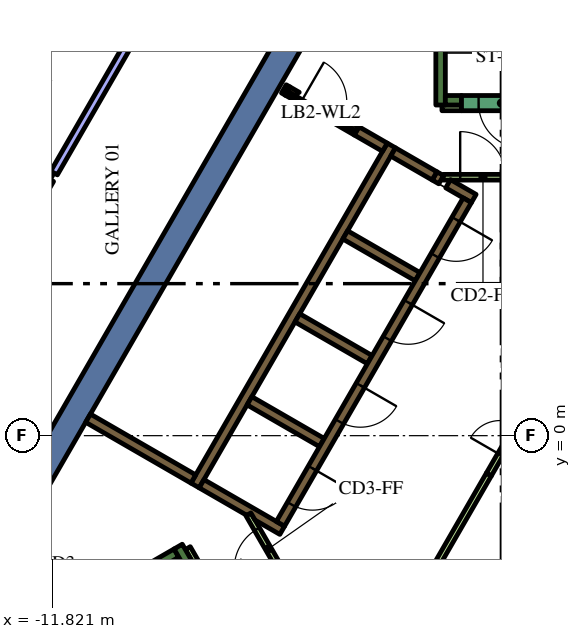
"""IFC4 building model, lengths in metres.
Left out: names, types, materials, properties, quantities, classifications, styles, units other than length and angle.
Written with IfcOpenShell. Run it as: python <this file> out.ifc"""

import sys

from ifc_helpers import new_model, si_unit, direction, frame, frame_2d, origin, place, context, subcontext, project, spatial, polyline, rectangle, outline, extrude, element, fill, save


model = new_model("IFC4")
c1 = context("Model", 3, precision=1e-05, world=origin(), true_north=direction((0.0, 1.0)))
c2 = subcontext(c1, "Body", "Model", "MODEL_VIEW")
j1 = project(units=[si_unit("LENGTHUNIT", "METRE"), si_unit("PLANEANGLEUNIT", "RADIAN")], contexts=[c1])
p1 = place(None, origin())
s1 = spatial("IfcSite", under=j1, at=p1, CompositionType="ELEMENT")
p2 = place(p1, origin())
s2 = spatial("IfcBuilding", under=s1, at=p2, CompositionType="ELEMENT")
p3 = place(p2, frame((0.0, 0.0, 231.0)))
s3 = spatial("IfcBuildingStorey", under=s2, at=p3, CompositionType="ELEMENT", Elevation=231.0)
p4 = place(p3, frame((-12.625, -1.867, 0.0), z_axis=(0.0, 0.0, 1.0), x_axis=(0.500008520515, 0.866020484407, 0.0)))
e1 = element("IfcWall", 1, at=p4, inside=s3, PredefinedType="SOLIDWALL", context=c2, shape_type="SweptSolid", body=[
    extrude(rectangle(XDim=15.859, YDim=0.7, at=frame_2d((7.929, 0.0))), origin(), (0.0, 0.0, 1.0), 4.2),
])
p5 = place(p3, frame((-1.6, 8.7, 0.0), z_axis=(0.0, 0.0, 1.0), x_axis=(0.0, 1.0, 0.0)))
e2 = element("IfcWall", 2, at=p5, inside=s3, PredefinedType="SOLIDWALL", context=c2, shape_type="SweptSolid", body=[
    extrude(rectangle(XDim=7.05, YDim=0.25, at=frame_2d((3.525, 0.0))), origin(), (0.0, 0.0, 1.0), 4.2),
])
p6 = place(p3, frame((-1.475, 8.825, 0.0), z_axis=(0.0, 0.0, 1.0), x_axis=(1.0, 0.0, 0.0)))
e3 = element("IfcWall", 3, at=p6, inside=s3, PredefinedType="SOLIDWALL", context=c2, shape_type="SweptSolid", body=[
    extrude(rectangle(XDim=0.425, YDim=0.25, at=frame_2d((0.212, 0.0))), origin(), (0.0, 0.0, 1.0), 4.2),
])
p7 = place(p3, frame((-14.44, -6.49, 0.0), z_axis=(0.0, 0.0, 1.0), x_axis=(0.866022966069, 0.500004222222, 0.0)))
e4 = element("IfcWall", 4, at=p7, inside=s3, PredefinedType="SOLIDWALL", context=c2, shape_type="SweptSolid", body=[
    extrude(rectangle(XDim=6.8, YDim=0.25, at=frame_2d((3.4, 0.0))), origin(), (0.0, 0.0, 1.0), 4.2),
])
p8 = place(p3, frame((-8.168, -3.503, 0.0), z_axis=(0.0, 0.0, 1.0), x_axis=(-0.499952099219, 0.866053057547, 0.0)))
e5 = element("IfcWall", 5, at=p8, inside=s3, PredefinedType="SOLIDWALL", context=c2, shape_type="SweptSolid", body=[
    extrude(rectangle(XDim=0.675, YDim=0.25, at=frame_2d((0.337, 0.0))), origin(), (0.0, 0.0, 1.0), 4.2),
])
p9 = place(p3, frame((-8.06, -1.311, 0.0), z_axis=(0.0, 0.0, 1.0), x_axis=(0.50000273126, 0.866023826885, 0.0)))
e6 = element("IfcWall", 6, at=p9, inside=s3, PredefinedType="SOLIDWALL", context=c2, shape_type="SweptSolid", body=[
    extrude(rectangle(XDim=10.33, YDim=0.25, at=frame_2d((5.165, 0.0))), origin(), (0.0, 0.0, 1.0), 4.2),
])
p10 = place(p3, frame((-1.758, 6.835, 0.0), z_axis=(0.0, 0.0, 1.0), x_axis=(0.865982457891, -0.500074377092, 0.0)))
e7 = element("IfcWall", 7, at=p10, inside=s3, PredefinedType="SOLIDWALL", context=c2, shape_type="SweptSolid", body=[
    extrude(rectangle(XDim=0.2, YDim=0.25, at=frame_2d((0.1, 0.0))), origin(), (0.0, 0.0, 1.0), 4.2),
])
p11 = place(p3, frame((-1.76, 6.836, 0.0), z_axis=(0.0, 0.0, 1.0), x_axis=(-0.865952863304, 0.500125622755, 0.0)))
e8 = element("IfcWall", 8, at=p11, inside=s3, PredefinedType="SOLIDWALL", context=c2, shape_type="SweptSolid", body=[
    extrude(rectangle(XDim=1.258, YDim=0.25, at=frame_2d((0.629, 0.0))), origin(), (0.0, 0.0, 1.0), 4.2),
])
p12 = place(p3, frame((-0.728, 6.24, 0.0), z_axis=(0.0, 0.0, 1.0), x_axis=(-0.865955664968, 0.500120771724, 0.0)))
e9 = element("IfcWall", 9, at=p12, inside=s3, PredefinedType="SOLIDWALL", context=c2, shape_type="SweptSolid", body=[
    extrude(rectangle(XDim=0.778, YDim=0.25, at=frame_2d((0.389, 0.0))), origin(), (0.0, 0.0, 1.0), 4.2),
])
for number, where, z_axis, x_axis in (
    (10, (-2.204, 4.182, 0.0), (0.0, 0.0, 1.0), (-0.866, 0.5, 0.0)),
    (11, (-5.369, 3.1, 0.0), (0.0, 0.0, 1.0), (0.866, -0.5, 0.0)),
    (12, (-4.724, -0.182, 0.0), (0.0, 0.0, 1.0), (-0.866, 0.5, 0.0)),
):
    element("IfcWall", number, at=place(p3, frame(where, z_axis=z_axis, x_axis=x_axis)), inside=s3, PredefinedType="SOLIDWALL", context=c2, shape_type="SweptSolid", body=[
        extrude(rectangle(XDim=2.2, YDim=0.25, at=frame_2d((1.1, 0.0))), origin(), (0.0, 0.0, 1.0), 4.2),
    ])
p13 = place(p3, origin())
e13 = element("IfcWall", 13, at=p13, inside=s3, PredefinedType="SOLIDWALL", context=c2, shape_type="SweptSolid", body=[
    extrude(outline(polyline([(-5.922, -2.257), (-5.922, -2.257), (-5.705, -2.382), (-5.83, -2.598), (-6.483, -2.221), (-6.591, -2.033), (-6.591, -2.033), (-6.7, -2.096), (-7.952, -1.373), (-7.827, -1.156), (-5.922, -2.257)])), origin(), (0.0, 0.0, 1.0), 4.2),
])
p14 = place(p3, frame((-8.106, -1.14, 0.0), z_axis=(0.0, 0.0, 1.0), x_axis=(-0.866008981251, 0.500028443584, 0.0)))
e14 = element("IfcWall", 14, at=p14, inside=s3, PredefinedType="SOLIDWALL", context=c2, shape_type="SweptSolid", body=[
    extrude(rectangle(XDim=3.2, YDim=0.25, at=frame_2d((1.6, 0.0))), origin(), (0.0, 0.0, 1.0), 4.2),
])
p15 = place(p3, frame((-5.725, 9.125, 0.0), z_axis=(0.0, 0.0, 1.0), x_axis=(0.866185586049, -0.49972245349, 0.0)))
e15 = element("IfcWall", 15, at=p15, inside=s3, PredefinedType="SOLIDWALL", context=c2, shape_type="SweptSolid", body=[
    extrude(rectangle(XDim=0.11, YDim=0.25, at=frame_2d((0.055, 0.0))), origin(), (0.0, 0.0, 1.0), 4.2),
])
p16 = place(p3, frame((-3.066, 7.59, 0.0), z_axis=(0.0, 0.0, 1.0), x_axis=(-0.866081358704, 0.49990307071, 0.0)))
e16 = element("IfcWall", 16, at=p16, inside=s3, PredefinedType="SOLIDWALL", context=c2, shape_type="SweptSolid", body=[
    extrude(rectangle(XDim=0.858, YDim=0.25, at=frame_2d((0.429, 0.0))), origin(), (0.0, 0.0, 1.0), 4.2),
])
e17 = element("IfcWall", 17, at=p13, inside=s3, PredefinedType="SOLIDWALL", context=c2, shape_type="SweptSolid", body=[
    extrude(outline(polyline([(-3.748, 8.128), (-3.813, 8.015), (-4.027, 8.139), (-4.017, 8.156), (-4.008, 8.173), (-4.0, 8.192), (-3.995, 8.21), (-3.991, 8.23), (-3.99, 8.25), (-3.99, 8.268), (-3.748, 8.128)])), origin(), (0.0, 0.0, 1.0), 4.2),
])
e18 = element("IfcWall", 18, at=p13, inside=s3, PredefinedType="SOLIDWALL", context=c2, shape_type="SweptSolid", body=[
    extrude(outline(polyline([(-5.689, 8.96), (-5.69, 8.961), (-5.565, 9.177), (-5.319, 9.035), (-5.335, 9.026), (-5.351, 9.015), (-5.366, 9.002), (-5.379, 8.988), (-5.392, 8.972), (-5.402, 8.956), (-5.412, 8.939), (-5.629, 9.064), (-5.629, 9.064), (-5.689, 8.96)])), origin(), (0.0, 0.0, 1.0), 4.2),
])
for number, where, z_axis, x_axis in (
    (19, (-8.252, -2.958, 0.0), (0.0, 0.0, 1.0), (0.5, -0.866, 0.0)),
    (20, (-1.564, 8.625, 0.0), (0.0, 0.0, 1.0), (1.0, 0.0, 0.0)),
):
    element("IfcWall", number, at=place(p3, frame(where, z_axis=z_axis, x_axis=x_axis)), inside=s3, PredefinedType="PARTITIONING", context=c2, shape_type="SweptSolid", body=[
        extrude(rectangle(XDim=0.514, YDim=0.15, at=frame_2d((0.257, 0.0))), origin(), (0.0, 0.0, 1.0), 3.45),
    ])
p17 = place(p3, frame((-1.887, -3.718, 0.0), z_axis=(0.0, 0.0, 1.0), x_axis=(0.500043732237, 0.866000153493, 0.0)))
e21 = element("IfcWall", 21, at=p17, inside=s3, PredefinedType="PARTITIONING", context=c2, shape_type="SweptSolid", body=[
    extrude(rectangle(XDim=3.114, YDim=0.15, at=frame_2d((1.557, 0.0))), origin(), (0.0, 0.0, 1.0), 3.45),
])
p18 = place(p3, frame((-0.898, 6.194, 0.0), z_axis=(0.0, 0.0, 1.0), x_axis=(-0.499996202215, -0.866027596426, 0.0)))
e22 = element("IfcWall", 22, at=p18, inside=s3, PredefinedType="SOLIDWALL", context=c2, shape_type="SweptSolid", body=[
    extrude(rectangle(XDim=9.83, YDim=0.25, at=frame_2d((4.915, 0.0))), origin(), (0.0, 0.0, 1.0), 4.2),
])
p19 = place(p18, frame((0.585, 0.0, 0.0)))
e23 = element("IfcOpeningElement", 23, at=p19, cuts=e22, PredefinedType="OPENING", context=c2, shape_type="SweptSolid", body=[
    extrude(rectangle(XDim=1.1, YDim=2.1, at=frame_2d((0.55, 1.05))), frame((0.0, 0.135, 0.0), z_axis=(0.0, -1.0, 0.0), x_axis=(1.0, 0.0, 0.0)), (0.0, 0.0, 1.0), 0.27),
])
p20 = place(p18, frame((3.105, 0.0, 0.0)))
e24 = element("IfcOpeningElement", 24, at=p20, cuts=e22, PredefinedType="OPENING", context=c2, shape_type="SweptSolid", body=[
    extrude(rectangle(XDim=1.1, YDim=2.1, at=frame_2d((0.55, 1.05))), frame((0.0, 0.135, 0.0), z_axis=(0.0, -1.0, 0.0), x_axis=(1.0, 0.0, 0.0)), (0.0, 0.0, 1.0), 0.27),
])
p21 = place(p18, frame((5.625, 0.0, 0.0)))
e25 = element("IfcOpeningElement", 25, at=p21, cuts=e22, PredefinedType="OPENING", context=c2, shape_type="SweptSolid", body=[
    extrude(rectangle(XDim=1.1, YDim=2.1, at=frame_2d((0.55, 1.05))), frame((0.0, 0.135, 0.0), z_axis=(0.0, -1.0, 0.0), x_axis=(1.0, 0.0, 0.0)), (0.0, 0.0, 1.0), 0.27),
])
p22 = place(p18, frame((8.145, 0.0, 0.0)))
e26 = element("IfcOpeningElement", 26, at=p22, cuts=e22, PredefinedType="OPENING", context=c2, shape_type="SweptSolid", body=[
    extrude(rectangle(XDim=1.1, YDim=2.1, at=frame_2d((0.55, 1.05))), frame((0.0, 0.135, 0.0), z_axis=(0.0, -1.0, 0.0), x_axis=(1.0, 0.0, 0.0)), (0.0, 0.0, 1.0), 0.27),
])
p23 = place(p3, frame((1.05, 8.75, 0.0), z_axis=(0.0, 0.0, 1.0), x_axis=(-1.0, 0.0, 0.0)))
e27 = element("IfcWall", 27, at=p23, inside=s3, PredefinedType="SOLIDWALL", context=c2, shape_type="SweptSolid", body=[
    extrude(rectangle(XDim=2.1, YDim=0.4, at=frame_2d((1.05, 0.0))), origin(), (0.0, 0.0, 1.0), 4.2),
])
p24 = place(p23, frame((0.45, 0.0, 0.0)))
e28 = element("IfcOpeningElement", 28, at=p24, cuts=e27, PredefinedType="OPENING", context=c2, shape_type="SweptSolid", body=[
    extrude(rectangle(XDim=1.2, YDim=2.1, at=frame_2d((0.6, 1.05))), frame((0.0, 0.21, 0.0), z_axis=(0.0, -1.0, 0.0), x_axis=(1.0, 0.0, 0.0)), (0.0, 0.0, 1.0), 0.42),
])
p25 = place(p3, frame((-0.33, -1.022, 0.0), z_axis=(0.0, 0.0, 1.0), x_axis=(0.500027713859, 0.866009402589, 0.0)))
e29 = element("IfcWall", 29, at=p25, inside=s3, PredefinedType="PARTITIONING", context=c2, shape_type="SweptSolid", body=[
    extrude(rectangle(XDim=2.1, YDim=0.15, at=frame_2d((1.05, 0.0))), origin(), (0.0, 0.0, 1.0), 3.45),
])
p26 = place(p25, frame((0.6, 0.0, 0.0)))
e30 = element("IfcOpeningElement", 30, at=p26, cuts=e29, PredefinedType="OPENING", context=c2, shape_type="SweptSolid", body=[
    extrude(rectangle(XDim=0.9, YDim=2.1, at=frame_2d((0.45, 1.05))), frame((0.0, 0.085, 0.0), z_axis=(0.0, -1.0, 0.0), x_axis=(1.0, 0.0, 0.0)), (0.0, 0.0, 1.0), 0.17),
])
p27 = place(p3, frame((-1.534, 6.8, 0.0), z_axis=(0.0, 0.0, 1.0), x_axis=(1.0, 0.0, 0.0)))
e31 = element("IfcWall", 31, at=p27, inside=s3, PredefinedType="PARTITIONING", context=c2, shape_type="SweptSolid", body=[
    extrude(rectangle(XDim=2.1, YDim=0.15, at=frame_2d((1.05, 0.0))), origin(), (0.0, 0.0, 1.0), 3.45),
])
p28 = place(p27, frame((0.45, 0.0, 0.0)))
e32 = element("IfcOpeningElement", 32, at=p28, cuts=e31, PredefinedType="OPENING", context=c2, shape_type="SweptSolid", body=[
    extrude(rectangle(XDim=1.2, YDim=2.1, at=frame_2d((0.6, 1.05))), frame((0.0, 0.085, 0.0), z_axis=(0.0, -1.0, 0.0), x_axis=(1.0, 0.0, 0.0)), (0.0, 0.0, 1.0), 0.17),
])
p29 = place(p3, frame((-5.606, -3.89, 0.0), z_axis=(0.0, 0.0, 1.0), x_axis=(-0.500027713859, 0.866009402589, 0.0)))
e33 = element("IfcWall", 33, at=p29, inside=s3, PredefinedType="PARTITIONING", context=c2, shape_type="SweptSolid", body=[
    extrude(rectangle(XDim=2.1, YDim=0.15, at=frame_2d((1.05, 0.0))), origin(), (0.0, 0.0, 1.0), 3.45),
])
p30 = place(p29, frame((0.45, 0.0, 0.0)))
e34 = element("IfcOpeningElement", 34, at=p30, cuts=e33, PredefinedType="OPENING", context=c2, shape_type="SweptSolid", body=[
    extrude(rectangle(XDim=1.2, YDim=2.1, at=frame_2d((0.6, 1.05))), frame((0.0, 0.085, 0.0), z_axis=(0.0, -1.0, 0.0), x_axis=(1.0, 0.0, 0.0)), (0.0, 0.0, 1.0), 0.17),
])
p31 = place(p3, frame((-5.659, 9.012, 0.0), z_axis=(0.0, 0.0, 1.0), x_axis=(0.866009402589, -0.500027713859, 0.0)))
e35 = element("IfcWall", 35, at=p31, inside=s3, PredefinedType="PARTITIONING", context=c2, shape_type="SweptSolid", body=[
    extrude(rectangle(XDim=2.1, YDim=0.12, at=frame_2d((1.05, 0.0))), origin(), (0.0, 0.0, 1.0), 3.45),
])
p32 = place(p31, frame((0.45, 0.0, 0.0)))
e36 = element("IfcOpeningElement", 36, at=p32, cuts=e35, PredefinedType="OPENING", context=c2, shape_type="SweptSolid", body=[
    extrude(rectangle(XDim=1.2, YDim=2.1, at=frame_2d((0.6, 1.05))), frame((0.0, 0.07, 0.0), z_axis=(0.0, -1.0, 0.0), x_axis=(1.0, 0.0, 0.0)), (0.0, 0.0, 1.0), 0.14),
])
p33 = place(p3, frame((-11.821, 6.825, 0.0), z_axis=(0.0, 0.0, 1.0), x_axis=(-0.866011792348, 0.500023574959, 0.0)))
e37 = element("IfcWall", 37, at=p33, inside=s3, PredefinedType="PARTITIONING", context=c2, shape_type="SweptSolid", body=[
    extrude(rectangle(XDim=5.381, YDim=0.2, at=frame_2d((2.69, 0.0))), origin(), (0.0, 0.0, 1.0), 3.45),
])
p34 = place(p3, frame((-7.061, 15.069, 0.0), z_axis=(0.0, 0.0, 1.0), x_axis=(-0.500008127286, -0.866020711443, 0.0)))
e38 = element("IfcWall", 38, at=p34, inside=s3, PredefinedType="PARTITIONING", context=c2, shape_type="SweptSolid", body=[
    extrude(rectangle(XDim=9.42, YDim=0.2, at=frame_2d((4.71, 0.0))), origin(), (0.0, 0.0, 1.0), 3.45),
])
p35 = place(p34, frame((4.2, 0.0, 0.0)))
e39 = element("IfcOpeningElement", 39, at=p35, cuts=e38, PredefinedType="OPENING", context=c2, shape_type="SweptSolid", body=[
    extrude(rectangle(XDim=1.0, YDim=2.1, at=frame_2d((0.5, 1.05))), frame((0.0, 0.11, 0.0), z_axis=(0.0, -1.0, 0.0), x_axis=(1.0, 0.0, 0.0)), (0.0, 0.0, 1.0), 0.22),
])
p36 = place(p3, frame((-11.871, 6.738, 0.0), z_axis=(0.0, 0.0, 1.0), x_axis=(-0.500019350398, -0.866014231539, 0.0)))
e40 = element("IfcWall", 40, at=p36, inside=s3, PredefinedType="PARTITIONING", context=c2, shape_type="SweptSolid", body=[
    extrude(rectangle(XDim=9.42, YDim=0.2, at=frame_2d((4.71, 0.0))), origin(), (0.0, 0.0, 1.0), 3.45),
])
p37 = place(p36, frame((4.2, 0.0, 0.0)))
e41 = element("IfcOpeningElement", 41, at=p37, cuts=e40, PredefinedType="OPENING", context=c2, shape_type="SweptSolid", body=[
    extrude(rectangle(XDim=1.0, YDim=2.1, at=frame_2d((0.5, 1.05))), frame((0.0, 0.11, 0.0), z_axis=(0.0, -1.0, 0.0), x_axis=(1.0, 0.0, 0.0)), (0.0, 0.0, 1.0), 0.22),
])
p38 = place(p19, origin())
e42 = element("IfcDoor", 42, at=p38, inside=s3, OperationType="DOUBLE_DOOR_SLIDING", PredefinedType="DOOR", context=c2, shape_type="SweptSolid", body=[
    extrude(rectangle(XDim=1.1, YDim=2.1, at=frame_2d((0.55, 1.05))), frame((0.0, 0.025, 0.0), z_axis=(0.0, -1.0, 0.0), x_axis=(1.0, 0.0, 0.0)), (0.0, 0.0, 1.0), 0.05),
])
fill(e23, e42)
p39 = place(p20, origin())
e43 = element("IfcDoor", 43, at=p39, inside=s3, OperationType="DOUBLE_DOOR_SLIDING", PredefinedType="DOOR", context=c2, shape_type="SweptSolid", body=[
    extrude(rectangle(XDim=1.1, YDim=2.1, at=frame_2d((0.55, 1.05))), frame((0.0, 0.025, 0.0), z_axis=(0.0, -1.0, 0.0), x_axis=(1.0, 0.0, 0.0)), (0.0, 0.0, 1.0), 0.05),
])
fill(e24, e43)
p40 = place(p21, origin())
e44 = element("IfcDoor", 44, at=p40, inside=s3, OperationType="DOUBLE_DOOR_SLIDING", PredefinedType="DOOR", context=c2, shape_type="SweptSolid", body=[
    extrude(rectangle(XDim=1.1, YDim=2.1, at=frame_2d((0.55, 1.05))), frame((0.0, 0.025, 0.0), z_axis=(0.0, -1.0, 0.0), x_axis=(1.0, 0.0, 0.0)), (0.0, 0.0, 1.0), 0.05),
])
fill(e25, e44)
p41 = place(p22, origin())
e45 = element("IfcDoor", 45, at=p41, inside=s3, OperationType="DOUBLE_DOOR_SLIDING", PredefinedType="DOOR", context=c2, shape_type="SweptSolid", body=[
    extrude(rectangle(XDim=1.1, YDim=2.1, at=frame_2d((0.55, 1.05))), frame((0.0, 0.025, 0.0), z_axis=(0.0, -1.0, 0.0), x_axis=(1.0, 0.0, 0.0)), (0.0, 0.0, 1.0), 0.05),
])
fill(e26, e45)
p42 = place(p24, origin())
e46 = element("IfcDoor", 46, at=p42, inside=s3, OperationType="SINGLE_SWING_LEFT", PredefinedType="DOOR", context=c2, shape_type="SweptSolid", body=[
    extrude(rectangle(XDim=1.2, YDim=2.1, at=frame_2d((0.6, 1.05))), frame((0.0, 0.025, 0.0), z_axis=(0.0, -1.0, 0.0), x_axis=(1.0, 0.0, 0.0)), (0.0, 0.0, 1.0), 0.05),
])
fill(e28, e46)
p43 = place(p26, origin())
e47 = element("IfcDoor", 47, at=p43, inside=s3, OperationType="SINGLE_SWING_LEFT", PredefinedType="DOOR", context=c2, shape_type="SweptSolid", body=[
    extrude(rectangle(XDim=0.9, YDim=2.1, at=frame_2d((0.45, 1.05))), frame((0.0, 0.025, 0.0), z_axis=(0.0, -1.0, 0.0), x_axis=(1.0, 0.0, 0.0)), (0.0, 0.0, 1.0), 0.05),
])
fill(e30, e47)
p44 = place(p28, origin())
e48 = element("IfcDoor", 48, at=p44, inside=s3, OperationType="SINGLE_SWING_LEFT", PredefinedType="DOOR", context=c2, shape_type="SweptSolid", body=[
    extrude(rectangle(XDim=1.2, YDim=2.1, at=frame_2d((0.6, 1.05))), frame((0.0, 0.025, 0.0), z_axis=(0.0, -1.0, 0.0), x_axis=(1.0, 0.0, 0.0)), (0.0, 0.0, 1.0), 0.05),
])
fill(e32, e48)
p45 = place(p30, origin())
e49 = element("IfcDoor", 49, at=p45, inside=s3, OperationType="SINGLE_SWING_LEFT", PredefinedType="DOOR", context=c2, shape_type="SweptSolid", body=[
    extrude(rectangle(XDim=1.2, YDim=2.1, at=frame_2d((0.6, 1.05))), frame((0.0, 0.025, 0.0), z_axis=(0.0, -1.0, 0.0), x_axis=(1.0, 0.0, 0.0)), (0.0, 0.0, 1.0), 0.05),
])
fill(e34, e49)
p46 = place(p32, origin())
e50 = element("IfcDoor", 50, at=p46, inside=s3, OperationType="SINGLE_SWING_LEFT", PredefinedType="DOOR", context=c2, shape_type="SweptSolid", body=[
    extrude(rectangle(XDim=1.2, YDim=2.1, at=frame_2d((0.6, 1.05))), frame((0.0, 0.025, 0.0), z_axis=(0.0, -1.0, 0.0), x_axis=(1.0, 0.0, 0.0)), (0.0, 0.0, 1.0), 0.05),
])
fill(e36, e50)
save(model, sys.argv[1])
